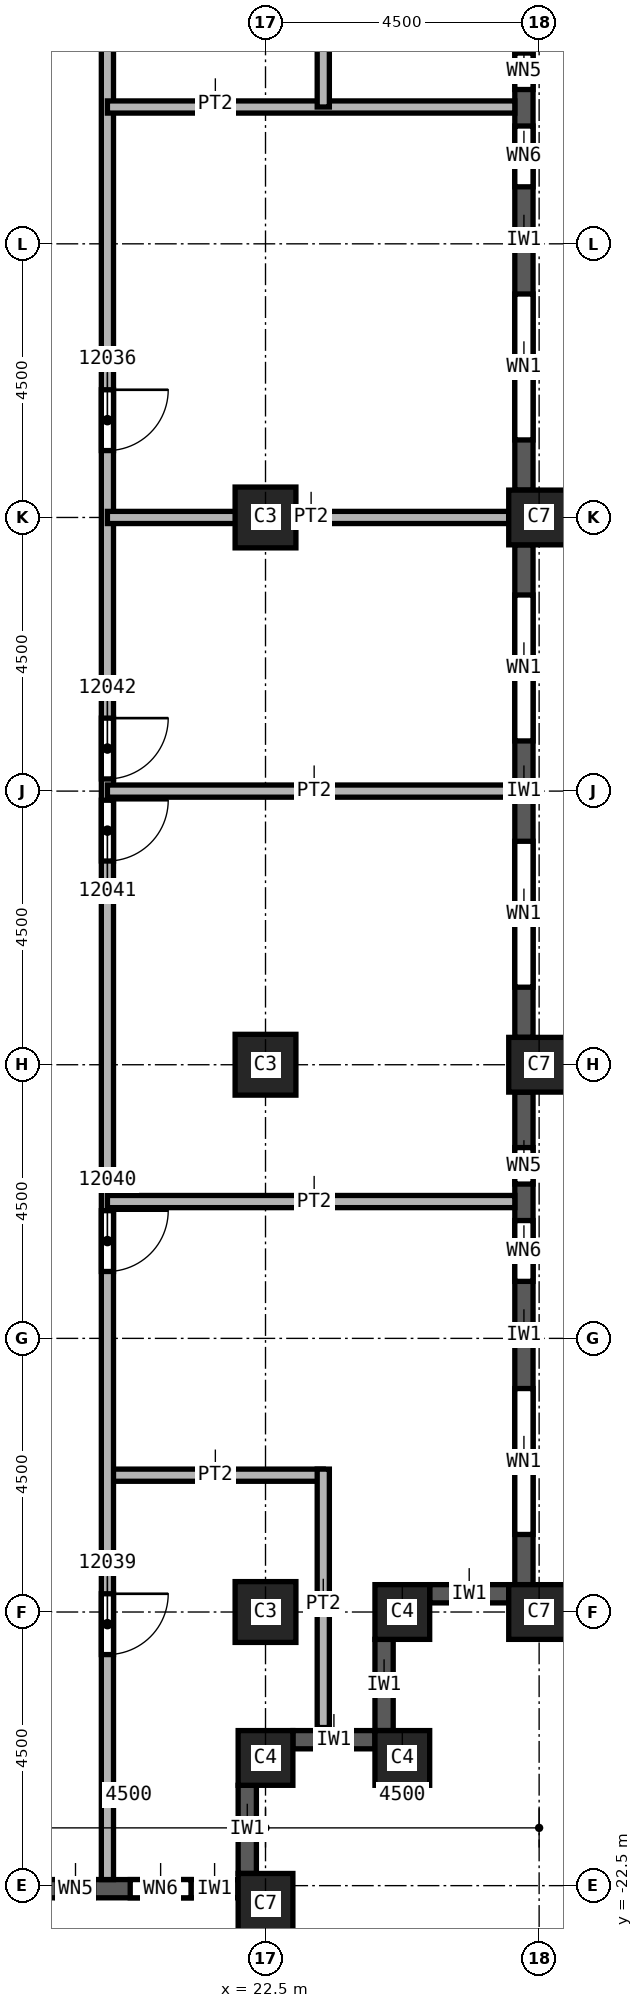
"""IFC4 building model, lengths in metres.
Left out: names, types, materials, properties, quantities, classifications, styles, units other than length and angle.
Written with IfcOpenShell. Run it as: python <this file> out.ifc"""

import sys

from ifc_helpers import new_model, si_unit, direction, frame, frame_2d, origin, origin_2d, place, context, subcontext, project, spatial, rectangle, extrude, element, fill, save


model = new_model("IFC4")
c1 = context("Model", 3, precision=1e-05, world=origin(), true_north=direction((0.0, 1.0)))
c2 = subcontext(c1, "Body", "Model", "MODEL_VIEW")
j1 = project(units=[si_unit("LENGTHUNIT", "METRE"), si_unit("PLANEANGLEUNIT", "RADIAN")], contexts=[c1])
p1 = place(None, origin())
s1 = spatial("IfcSite", under=j1, at=p1, CompositionType="ELEMENT")
p2 = place(p1, origin())
s2 = spatial("IfcBuilding", under=s1, at=p2, CompositionType="ELEMENT")
p3 = place(p2, frame((0.0, 0.0, 196.0)))
s3 = spatial("IfcBuildingStorey", under=s2, at=p3, CompositionType="ELEMENT", Elevation=196.0)
for number, where, z_axis, x_axis in (
    (1, (22.5, 0.0, 0.0), (0.0, 0.0, 1.0), (1.0, 0.0, 0.0)),
    (2, (22.5, -9.0, 0.0), (0.0, 0.0, 1.0), (1.0, 0.0, 0.0)),
    (3, (22.5, -18.0, 0.0), (0.0, 0.0, 1.0), (1.0, 0.0, 0.0)),
):
    element("IfcColumn", number, at=place(p3, frame(where, z_axis=z_axis, x_axis=x_axis)), inside=s3, PredefinedType="COLUMN", context=c2, shape_type="SweptSolid", body=[
        extrude(rectangle(XDim=1.0, YDim=1.0, at=origin_2d()), origin(), (0.0, 0.0, 1.0), 3.72),
    ])
for number, where, z_axis, x_axis in (
    (4, (27.0, 0.0, 0.0), (0.0, 0.0, 1.0), (0.0, 1.0, 0.0)),
    (5, (27.0, -9.0, 0.0), (0.0, 0.0, 1.0), (0.0, 1.0, 0.0)),
    (6, (27.0, -18.0, 0.0), (0.0, 0.0, 1.0), (0.0, 1.0, 0.0)),
    (7, (22.5, -22.8, 0.0), (0.0, 0.0, 1.0), (1.0, 0.0, 0.0)),
):
    element("IfcColumn", number, at=place(p3, frame(where, z_axis=z_axis, x_axis=x_axis)), inside=s3, PredefinedType="COLUMN", context=c2, shape_type="SweptSolid", body=[
        extrude(rectangle(XDim=0.9, YDim=1.0, at=origin_2d()), origin(), (0.0, 0.0, 1.0), 3.72),
    ])
for number, where, z_axis, x_axis in (
    (8, (22.5, -20.4, 0.0), (0.0, 0.0, 1.0), (1.0, 0.0, 0.0)),
    (9, (24.75, -20.4, 0.0), (0.0, 0.0, 1.0), (1.0, 0.0, 0.0)),
    (10, (24.75, -18.0, 0.0), (0.0, 0.0, 1.0), (1.0, 0.0, 0.0)),
):
    element("IfcColumn", number, at=place(p3, frame(where, z_axis=z_axis, x_axis=x_axis)), inside=s3, PredefinedType="COLUMN", context=c2, shape_type="SweptSolid", body=[
        extrude(rectangle(XDim=0.9, YDim=0.9, at=origin_2d()), origin(), (0.0, 0.0, 1.0), 3.72),
    ])
p4 = place(p3, frame((18.45, -22.55, 0.0), z_axis=(0.0, 0.0, 1.0), x_axis=(1.0, 0.0, 0.0)))
e11 = element("IfcWall", 11, at=p4, inside=s3, PredefinedType="SOLIDWALL", context=c2, shape_type="SweptSolid", body=[
    extrude(rectangle(XDim=3.6, YDim=0.3, at=frame_2d((1.8, 0.0))), origin(), (0.0, 0.0, 1.0), 3.12),
])
p5 = place(p4, frame((0.625, 0.0, 0.8)))
e12 = element("IfcOpeningElement", 12, at=p5, cuts=e11, PredefinedType="OPENING", context=c2, shape_type="SweptSolid", body=[
    extrude(rectangle(XDim=0.6, YDim=1.95, at=frame_2d((0.3, 0.975))), frame((0.0, 0.15, 0.0), z_axis=(0.0, -1.0, 0.0), x_axis=(1.0, 0.0, 0.0)), (0.0, 0.0, 1.0), 0.3),
])
p6 = place(p4, frame((1.825, 0.0, 0.8)))
e13 = element("IfcOpeningElement", 13, at=p6, cuts=e11, PredefinedType="OPENING", context=c2, shape_type="SweptSolid", body=[
    extrude(rectangle(XDim=1.0, YDim=1.95, at=frame_2d((0.5, 0.975))), frame((0.0, 0.15, 0.0), z_axis=(0.0, -1.0, 0.0), x_axis=(1.0, 0.0, 0.0)), (0.0, 0.0, 1.0), 0.3),
])
p7 = place(p3, frame((22.2, -22.3, 0.0), z_axis=(0.0, 0.0, 1.0), x_axis=(0.0, 1.0, 0.0)))
e14 = element("IfcWall", 14, at=p7, inside=s3, PredefinedType="SOLIDWALL", context=c2, shape_type="SweptSolid", body=[
    extrude(rectangle(XDim=1.45, YDim=0.3, at=frame_2d((0.725, 0.0))), origin(), (0.0, 0.0, 1.0), 3.12),
])
p8 = place(p3, frame((22.95, -20.1, 0.0), z_axis=(0.0, 0.0, 1.0), x_axis=(1.0, 0.0, 0.0)))
e15 = element("IfcWall", 15, at=p8, inside=s3, PredefinedType="SOLIDWALL", context=c2, shape_type="SweptSolid", body=[
    extrude(rectangle(XDim=1.35, YDim=0.3, at=frame_2d((0.675, 0.0))), origin(), (0.0, 0.0, 1.0), 3.12),
])
p9 = place(p3, frame((24.45, -19.95, 0.0), z_axis=(0.0, 0.0, 1.0), x_axis=(0.0, 1.0, 0.0)))
e16 = element("IfcWall", 16, at=p9, inside=s3, PredefinedType="SOLIDWALL", context=c2, shape_type="SweptSolid", body=[
    extrude(rectangle(XDim=1.5, YDim=0.3, at=frame_2d((0.75, 0.0))), origin(), (0.0, 0.0, 1.0), 3.12),
])
p10 = place(p3, frame((25.2, -17.7, 0.0), z_axis=(0.0, 0.0, 1.0), x_axis=(1.0, 0.0, 0.0)))
e17 = element("IfcWall", 17, at=p10, inside=s3, PredefinedType="SOLIDWALL", context=c2, shape_type="SweptSolid", body=[
    extrude(rectangle(XDim=1.3, YDim=0.3, at=frame_2d((0.65, 0.0))), origin(), (0.0, 0.0, 1.0), 3.12),
])
p11 = place(p3, frame((26.75, -17.55, 0.0), z_axis=(0.0, 0.0, 1.0), x_axis=(0.0, 1.0, 0.0)))
e18 = element("IfcWall", 18, at=p11, inside=s3, PredefinedType="SOLIDWALL", context=c2, shape_type="SweptSolid", body=[
    extrude(rectangle(XDim=8.1, YDim=0.3, at=frame_2d((4.05, 0.0))), origin(), (0.0, 0.0, 1.0), 3.12),
])
p12 = place(p11, frame((0.825, 0.0, 0.8)))
e19 = element("IfcOpeningElement", 19, at=p12, cuts=e18, PredefinedType="OPENING", context=c2, shape_type="SweptSolid", body=[
    extrude(rectangle(XDim=2.4, YDim=1.95, at=frame_2d((1.2, 0.975))), frame((0.0, 0.15, 0.0), z_axis=(0.0, -1.0, 0.0), x_axis=(1.0, 0.0, 0.0)), (0.0, 0.0, 1.0), 0.3),
])
p13 = place(p11, frame((4.988, 0.0, 0.8)))
e20 = element("IfcOpeningElement", 20, at=p13, cuts=e18, PredefinedType="OPENING", context=c2, shape_type="SweptSolid", body=[
    extrude(rectangle(XDim=1.0, YDim=1.95, at=frame_2d((0.5, 0.975))), frame((0.0, 0.15, 0.0), z_axis=(0.0, -1.0, 0.0), x_axis=(1.0, 0.0, 0.0)), (0.0, 0.0, 1.0), 0.3),
])
p14 = place(p11, frame((6.587, 0.0, 0.8)))
e21 = element("IfcOpeningElement", 21, at=p14, cuts=e18, PredefinedType="OPENING", context=c2, shape_type="SweptSolid", body=[
    extrude(rectangle(XDim=0.6, YDim=1.95, at=frame_2d((0.3, 0.975))), frame((0.0, 0.15, 0.0), z_axis=(0.0, -1.0, 0.0), x_axis=(1.0, 0.0, 0.0)), (0.0, 0.0, 1.0), 0.3),
])
p15 = place(p3, frame((26.75, -8.55, 0.0), z_axis=(0.0, 0.0, 1.0), x_axis=(0.0, 1.0, 0.0)))
e22 = element("IfcWall", 22, at=p15, inside=s3, PredefinedType="SOLIDWALL", context=c2, shape_type="SweptSolid", body=[
    extrude(rectangle(XDim=8.1, YDim=0.3, at=frame_2d((4.05, 0.0))), origin(), (0.0, 0.0, 1.0), 3.12),
])
p16 = place(p15, frame((0.825, 0.0, 0.8)))
e23 = element("IfcOpeningElement", 23, at=p16, cuts=e22, PredefinedType="OPENING", context=c2, shape_type="SweptSolid", body=[
    extrude(rectangle(XDim=2.4, YDim=1.95, at=frame_2d((1.2, 0.975))), frame((0.0, 0.15, 0.0), z_axis=(0.0, -1.0, 0.0), x_axis=(1.0, 0.0, 0.0)), (0.0, 0.0, 1.0), 0.3),
])
p17 = place(p15, frame((4.875, 0.0, 0.8)))
e24 = element("IfcOpeningElement", 24, at=p17, cuts=e22, PredefinedType="OPENING", context=c2, shape_type="SweptSolid", body=[
    extrude(rectangle(XDim=2.4, YDim=1.95, at=frame_2d((1.2, 0.975))), frame((0.0, 0.15, 0.0), z_axis=(0.0, -1.0, 0.0), x_axis=(1.0, 0.0, 0.0)), (0.0, 0.0, 1.0), 0.3),
])
p18 = place(p3, frame((26.75, 0.45, 0.0), z_axis=(0.0, 0.0, 1.0), x_axis=(0.0, 1.0, 0.0)))
e25 = element("IfcWall", 25, at=p18, inside=s3, PredefinedType="SOLIDWALL", context=c2, shape_type="SweptSolid", body=[
    extrude(rectangle(XDim=8.1, YDim=0.3, at=frame_2d((4.05, 0.0))), origin(), (0.0, 0.0, 1.0), 3.12),
])
p19 = place(p18, frame((0.825, 0.0, 0.8)))
e26 = element("IfcOpeningElement", 26, at=p19, cuts=e25, PredefinedType="OPENING", context=c2, shape_type="SweptSolid", body=[
    extrude(rectangle(XDim=2.4, YDim=1.95, at=frame_2d((1.2, 0.975))), frame((0.0, 0.15, 0.0), z_axis=(0.0, -1.0, 0.0), x_axis=(1.0, 0.0, 0.0)), (0.0, 0.0, 1.0), 0.3),
])
p20 = place(p18, frame((4.988, 0.0, 0.8)))
e27 = element("IfcOpeningElement", 27, at=p20, cuts=e25, PredefinedType="OPENING", context=c2, shape_type="SweptSolid", body=[
    extrude(rectangle(XDim=1.0, YDim=1.95, at=frame_2d((0.5, 0.975))), frame((0.0, 0.15, 0.0), z_axis=(0.0, -1.0, 0.0), x_axis=(1.0, 0.0, 0.0)), (0.0, 0.0, 1.0), 0.3),
])
p21 = place(p18, frame((6.587, 0.0, 0.8)))
e28 = element("IfcOpeningElement", 28, at=p21, cuts=e25, PredefinedType="OPENING", context=c2, shape_type="SweptSolid", body=[
    extrude(rectangle(XDim=0.6, YDim=1.95, at=frame_2d((0.3, 0.975))), frame((0.0, 0.15, 0.0), z_axis=(0.0, -1.0, 0.0), x_axis=(1.0, 0.0, 0.0)), (0.0, 0.0, 1.0), 0.3),
])
p22 = place(p3, frame((19.9, -15.75, 0.0), z_axis=(0.0, 0.0, 1.0), x_axis=(1.0, 0.0, 0.0)))
e29 = element("IfcWall", 29, at=p22, inside=s3, PredefinedType="PARTITIONING", context=c2, shape_type="SweptSolid", body=[
    extrude(rectangle(XDim=3.55, YDim=0.2, at=frame_2d((1.775, 0.0))), origin(), (0.0, 0.0, 1.0), 3.72),
])
p23 = place(p3, frame((19.9, 22.4, 0.0), z_axis=(0.0, 0.0, 1.0), x_axis=(0.0, -1.0, 0.0)))
e30 = element("IfcWall", 30, at=p23, inside=s3, PredefinedType="PARTITIONING", context=c2, shape_type="SweptSolid", body=[
    extrude(rectangle(XDim=44.8, YDim=0.2, at=frame_2d((22.4, 0.0))), origin(), (0.0, 0.0, 1.0), 3.72),
])
p24 = place(p23, frame((20.3, 0.0, 0.0)))
e31 = element("IfcOpeningElement", 31, at=p24, cuts=e30, PredefinedType="OPENING", context=c2, shape_type="SweptSolid", body=[
    extrude(rectangle(XDim=1.0, YDim=2.1, at=frame_2d((0.5, 1.05))), frame((0.0, 0.1, 0.0), z_axis=(0.0, -1.0, 0.0), x_axis=(1.0, 0.0, 0.0)), (0.0, 0.0, 1.0), 0.2),
])
p25 = place(p23, frame((8.35, 0.0, 0.0)))
e32 = element("IfcOpeningElement", 32, at=p25, cuts=e30, PredefinedType="OPENING", context=c2, shape_type="SweptSolid", body=[
    extrude(rectangle(XDim=1.0, YDim=2.1, at=frame_2d((0.5, 1.05))), frame((0.0, 0.1, 0.0), z_axis=(0.0, -1.0, 0.0), x_axis=(1.0, 0.0, 0.0)), (0.0, 0.0, 1.0), 0.2),
])
p26 = place(p23, frame((40.1, 0.0, 0.0)))
e33 = element("IfcOpeningElement", 33, at=p26, cuts=e30, PredefinedType="OPENING", context=c2, shape_type="SweptSolid", body=[
    extrude(rectangle(XDim=1.0, YDim=2.1, at=frame_2d((0.5, 1.05))), frame((0.0, 0.1, 0.0), z_axis=(0.0, -1.0, 0.0), x_axis=(1.0, 0.0, 0.0)), (0.0, 0.0, 1.0), 0.2),
])
p27 = place(p23, frame((33.8, 0.0, 0.0)))
e34 = element("IfcOpeningElement", 34, at=p27, cuts=e30, PredefinedType="OPENING", context=c2, shape_type="SweptSolid", body=[
    extrude(rectangle(XDim=1.0, YDim=2.1, at=frame_2d((0.5, 1.05))), frame((0.0, 0.1, 0.0), z_axis=(0.0, -1.0, 0.0), x_axis=(1.0, 0.0, 0.0)), (0.0, 0.0, 1.0), 0.2),
])
p28 = place(p23, frame((27.05, 0.0, 0.0)))
e35 = element("IfcOpeningElement", 35, at=p28, cuts=e30, PredefinedType="OPENING", context=c2, shape_type="SweptSolid", body=[
    extrude(rectangle(XDim=1.0, YDim=2.1, at=frame_2d((0.5, 1.05))), frame((0.0, 0.1, 0.0), z_axis=(0.0, -1.0, 0.0), x_axis=(1.0, 0.0, 0.0)), (0.0, 0.0, 1.0), 0.2),
])
p29 = place(p23, frame((25.7, 0.0, 0.0)))
e36 = element("IfcOpeningElement", 36, at=p29, cuts=e30, PredefinedType="OPENING", context=c2, shape_type="SweptSolid", body=[
    extrude(rectangle(XDim=1.0, YDim=2.1, at=frame_2d((0.5, 1.05))), frame((0.0, 0.1, 0.0), z_axis=(0.0, -1.0, 0.0), x_axis=(1.0, 0.0, 0.0)), (0.0, 0.0, 1.0), 0.2),
])
for number, where, z_axis, x_axis in (
    (37, (19.9, -11.25, 0.0), (0.0, 0.0, 1.0), (1.0, 0.0, 0.0)),
    (38, (19.9, -4.5, 0.0), (0.0, 0.0, 1.0), (1.0, 0.0, 0.0)),
    (39, (19.9, 6.75, 0.0), (0.0, 0.0, 1.0), (1.0, 0.0, 0.0)),
):
    element("IfcWall", number, at=place(p3, frame(where, z_axis=z_axis, x_axis=x_axis)), inside=s3, PredefinedType="PARTITIONING", context=c2, shape_type="SweptSolid", body=[
        extrude(rectangle(XDim=6.7, YDim=0.2, at=frame_2d((3.35, 0.0))), origin(), (0.0, 0.0, 1.0), 3.72),
    ])
p30 = place(p3, frame((23.45, -15.65, 0.0), z_axis=(0.0, 0.0, 1.0), x_axis=(0.0, -1.0, 0.0)))
e40 = element("IfcWall", 40, at=p30, inside=s3, PredefinedType="PARTITIONING", context=c2, shape_type="SweptSolid", body=[
    extrude(rectangle(XDim=4.25, YDim=0.2, at=frame_2d((2.125, 0.0))), origin(), (0.0, 0.0, 1.0), 3.72),
])
p31 = place(p3, frame((26.5, 0.0, 0.0), z_axis=(0.0, 0.0, 1.0), x_axis=(-1.0, 0.0, 0.0)))
e41 = element("IfcWall", 41, at=p31, inside=s3, PredefinedType="PARTITIONING", context=c2, shape_type="SweptSolid", body=[
    extrude(rectangle(XDim=6.6, YDim=0.2, at=frame_2d((3.3, 0.0))), origin(), (0.0, 0.0, 1.0), 3.72),
])
p32 = place(p3, frame((23.45, 19.9, 0.0), z_axis=(0.0, 0.0, 1.0), x_axis=(0.0, -1.0, 0.0)))
e42 = element("IfcWall", 42, at=p32, inside=s3, PredefinedType="PARTITIONING", context=c2, shape_type="SweptSolid", body=[
    extrude(rectangle(XDim=13.15, YDim=0.2, at=frame_2d((6.575, 0.0))), origin(), (0.0, 0.0, 1.0), 3.72),
])
p33 = place(p32, frame((6.1, 0.0, 0.0)))
e43 = element("IfcOpeningElement", 43, at=p33, cuts=e42, PredefinedType="OPENING", context=c2, shape_type="SweptSolid", body=[
    extrude(rectangle(XDim=1.0, YDim=2.1, at=frame_2d((0.5, 1.05))), frame((0.0, 0.1, 0.0), z_axis=(0.0, -1.0, 0.0), x_axis=(1.0, 0.0, 0.0)), (0.0, 0.0, 1.0), 0.2),
])
p34 = place(p12, origin())
e44 = element("IfcWindow", 44, at=p34, inside=s3, PartitioningType="SINGLE_PANEL", PredefinedType="WINDOW", context=c2, shape_type="SweptSolid", body=[
    extrude(rectangle(XDim=2.4, YDim=1.95, at=frame_2d((1.2, 0.975))), frame((0.0, 0.03, 0.0), z_axis=(0.0, -1.0, 0.0), x_axis=(1.0, 0.0, 0.0)), (0.0, 0.0, 1.0), 0.06),
])
fill(e19, e44)
p35 = place(p16, origin())
e45 = element("IfcWindow", 45, at=p35, inside=s3, PartitioningType="SINGLE_PANEL", PredefinedType="WINDOW", context=c2, shape_type="SweptSolid", body=[
    extrude(rectangle(XDim=2.4, YDim=1.95, at=frame_2d((1.2, 0.975))), frame((0.0, 0.03, 0.0), z_axis=(0.0, -1.0, 0.0), x_axis=(1.0, 0.0, 0.0)), (0.0, 0.0, 1.0), 0.06),
])
fill(e23, e45)
p36 = place(p17, origin())
e46 = element("IfcWindow", 46, at=p36, inside=s3, PartitioningType="SINGLE_PANEL", PredefinedType="WINDOW", context=c2, shape_type="SweptSolid", body=[
    extrude(rectangle(XDim=2.4, YDim=1.95, at=frame_2d((1.2, 0.975))), frame((0.0, 0.03, 0.0), z_axis=(0.0, -1.0, 0.0), x_axis=(1.0, 0.0, 0.0)), (0.0, 0.0, 1.0), 0.06),
])
fill(e24, e46)
p37 = place(p19, origin())
e47 = element("IfcWindow", 47, at=p37, inside=s3, PartitioningType="SINGLE_PANEL", PredefinedType="WINDOW", context=c2, shape_type="SweptSolid", body=[
    extrude(rectangle(XDim=2.4, YDim=1.95, at=frame_2d((1.2, 0.975))), frame((0.0, 0.03, 0.0), z_axis=(0.0, -1.0, 0.0), x_axis=(1.0, 0.0, 0.0)), (0.0, 0.0, 1.0), 0.06),
])
fill(e26, e47)
p38 = place(p24, origin())
e48 = element("IfcDoor", 48, at=p38, inside=s3, OperationType="SINGLE_SWING_LEFT", PredefinedType="DOOR", context=c2, shape_type="SweptSolid", body=[
    extrude(rectangle(XDim=1.0, YDim=2.1, at=frame_2d((0.5, 1.05))), frame((0.0, 0.025, 0.0), z_axis=(0.0, -1.0, 0.0), x_axis=(1.0, 0.0, 0.0)), (0.0, 0.0, 1.0), 0.05),
])
fill(e31, e48)
p39 = place(p26, origin())
e49 = element("IfcDoor", 49, at=p39, inside=s3, OperationType="SINGLE_SWING_RIGHT", PredefinedType="DOOR", context=c2, shape_type="SweptSolid", body=[
    extrude(rectangle(XDim=1.0, YDim=2.1, at=frame_2d((0.5, 1.05))), frame((0.0, 0.025, 0.0), z_axis=(0.0, -1.0, 0.0), x_axis=(1.0, 0.0, 0.0)), (0.0, 0.0, 1.0), 0.05),
])
fill(e33, e49)
p40 = place(p27, origin())
e50 = element("IfcDoor", 50, at=p40, inside=s3, OperationType="SINGLE_SWING_LEFT", PredefinedType="DOOR", context=c2, shape_type="SweptSolid", body=[
    extrude(rectangle(XDim=1.0, YDim=2.1, at=frame_2d((0.5, 1.05))), frame((0.0, 0.025, 0.0), z_axis=(0.0, -1.0, 0.0), x_axis=(1.0, 0.0, 0.0)), (0.0, 0.0, 1.0), 0.05),
])
fill(e34, e50)
p41 = place(p28, origin())
e51 = element("IfcDoor", 51, at=p41, inside=s3, OperationType="SINGLE_SWING_RIGHT", PredefinedType="DOOR", context=c2, shape_type="SweptSolid", body=[
    extrude(rectangle(XDim=1.0, YDim=2.1, at=frame_2d((0.5, 1.05))), frame((0.0, 0.025, 0.0), z_axis=(0.0, -1.0, 0.0), x_axis=(1.0, 0.0, 0.0)), (0.0, 0.0, 1.0), 0.05),
])
fill(e35, e51)
p42 = place(p29, origin())
e52 = element("IfcDoor", 52, at=p42, inside=s3, OperationType="SINGLE_SWING_LEFT", PredefinedType="DOOR", context=c2, shape_type="SweptSolid", body=[
    extrude(rectangle(XDim=1.0, YDim=2.1, at=frame_2d((0.5, 1.05))), frame((0.0, 0.025, 0.0), z_axis=(0.0, -1.0, 0.0), x_axis=(1.0, 0.0, 0.0)), (0.0, 0.0, 1.0), 0.05),
])
fill(e36, e52)
p43 = place(p5, origin())
e53 = element("IfcWindow", 53, at=p43, inside=s3, PartitioningType="SINGLE_PANEL", PredefinedType="WINDOW", context=c2, shape_type="SweptSolid", body=[
    extrude(rectangle(XDim=0.6, YDim=1.95, at=frame_2d((0.3, 0.975))), frame((0.0, 0.03, 0.0), z_axis=(0.0, -1.0, 0.0), x_axis=(1.0, 0.0, 0.0)), (0.0, 0.0, 1.0), 0.06),
])
fill(e12, e53)
p44 = place(p6, origin())
e54 = element("IfcWindow", 54, at=p44, inside=s3, PartitioningType="SINGLE_PANEL", PredefinedType="WINDOW", context=c2, shape_type="SweptSolid", body=[
    extrude(rectangle(XDim=1.0, YDim=1.95, at=frame_2d((0.5, 0.975))), frame((0.0, 0.03, 0.0), z_axis=(0.0, -1.0, 0.0), x_axis=(1.0, 0.0, 0.0)), (0.0, 0.0, 1.0), 0.06),
])
fill(e13, e54)
p45 = place(p13, origin())
e55 = element("IfcWindow", 55, at=p45, inside=s3, PartitioningType="SINGLE_PANEL", PredefinedType="WINDOW", context=c2, shape_type="SweptSolid", body=[
    extrude(rectangle(XDim=1.0, YDim=1.95, at=frame_2d((0.5, 0.975))), frame((0.0, 0.03, 0.0), z_axis=(0.0, -1.0, 0.0), x_axis=(1.0, 0.0, 0.0)), (0.0, 0.0, 1.0), 0.06),
])
fill(e20, e55)
p46 = place(p14, origin())
e56 = element("IfcWindow", 56, at=p46, inside=s3, PartitioningType="SINGLE_PANEL", PredefinedType="WINDOW", context=c2, shape_type="SweptSolid", body=[
    extrude(rectangle(XDim=0.6, YDim=1.95, at=frame_2d((0.3, 0.975))), frame((0.0, 0.03, 0.0), z_axis=(0.0, -1.0, 0.0), x_axis=(1.0, 0.0, 0.0)), (0.0, 0.0, 1.0), 0.06),
])
fill(e21, e56)
p47 = place(p20, origin())
e57 = element("IfcWindow", 57, at=p47, inside=s3, PartitioningType="SINGLE_PANEL", PredefinedType="WINDOW", context=c2, shape_type="SweptSolid", body=[
    extrude(rectangle(XDim=1.0, YDim=1.95, at=frame_2d((0.5, 0.975))), frame((0.0, 0.03, 0.0), z_axis=(0.0, -1.0, 0.0), x_axis=(1.0, 0.0, 0.0)), (0.0, 0.0, 1.0), 0.06),
])
fill(e27, e57)
p48 = place(p21, origin())
e58 = element("IfcWindow", 58, at=p48, inside=s3, PartitioningType="SINGLE_PANEL", PredefinedType="WINDOW", context=c2, shape_type="SweptSolid", body=[
    extrude(rectangle(XDim=0.6, YDim=1.95, at=frame_2d((0.3, 0.975))), frame((0.0, 0.03, 0.0), z_axis=(0.0, -1.0, 0.0), x_axis=(1.0, 0.0, 0.0)), (0.0, 0.0, 1.0), 0.06),
])
fill(e28, e58)
save(model, sys.argv[1])
